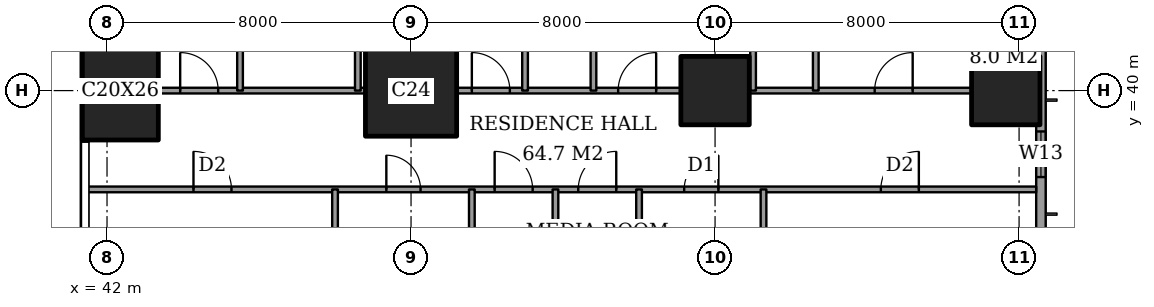
"""IFC4 building model, lengths in metres.
Left out: names, types, materials, properties, quantities, classifications, styles, units other than length and angle.
Written with IfcOpenShell. Run it as: python <this file> out.ifc"""

import sys

from ifc_helpers import new_model, si_unit, direction, frame, frame_2d, origin, origin_2d, place, context, subcontext, project, spatial, rectangle, extrude, element, fill, save


model = new_model("IFC4")
c1 = context("Model", 3, precision=1e-05, world=origin(), true_north=direction((0.0, 1.0)))
c2 = subcontext(c1, "Body", "Model", "MODEL_VIEW")
j1 = project(units=[si_unit("LENGTHUNIT", "METRE"), si_unit("PLANEANGLEUNIT", "RADIAN")], contexts=[c1])
p1 = place(None, origin())
s1 = spatial("IfcSite", under=j1, at=p1, CompositionType="ELEMENT")
p2 = place(p1, origin())
s2 = spatial("IfcBuilding", under=s1, at=p2, CompositionType="ELEMENT")
p3 = place(p2, frame((0.0, 0.0, 211.0)))
s3 = spatial("IfcBuildingStorey", under=s2, at=p3, CompositionType="ELEMENT", Elevation=211.0)
p4 = place(p3, frame((42.35, 40.0, 0.0), z_axis=(0.0, 0.0, 1.0), x_axis=(1.0, 0.0, 0.0)))
e1 = element("IfcColumn", 1, at=p4, inside=s3, PredefinedType="COLUMN", context=c2, shape_type="SweptSolid", body=[
    extrude(rectangle(XDim=2.0, YDim=2.6, at=origin_2d()), origin(), (0.0, 0.0, 1.0), 3.6),
])
p5 = place(p3, frame((50.0, 40.0, 0.0), z_axis=(0.0, 0.0, 1.0), x_axis=(1.0, 0.0, 0.0)))
e2 = element("IfcColumn", 2, at=p5, inside=s3, PredefinedType="COLUMN", context=c2, shape_type="SweptSolid", body=[
    extrude(rectangle(XDim=2.4, YDim=2.4, at=origin_2d()), origin(), (0.0, 0.0, 1.0), 3.6),
])
for number, where, z_axis, x_axis in (
    (3, (58.0, 40.0, 0.0), (0.0, 0.0, 1.0), (1.0, 0.0, 0.0)),
    (4, (65.65, 40.0, 0.0), (0.0, 0.0, 1.0), (1.0, 0.0, 0.0)),
):
    element("IfcColumn", number, at=place(p3, frame(where, z_axis=z_axis, x_axis=x_axis)), inside=s3, PredefinedType="COLUMN", context=c2, shape_type="SweptSolid", body=[
        extrude(rectangle(XDim=1.8, YDim=1.8, at=origin_2d()), origin(), (0.0, 0.0, 1.0), 3.6),
    ])
p6 = place(p3, frame((66.575, 3.175, 0.0), z_axis=(0.0, 0.0, 1.0), x_axis=(0.0, 1.0, 0.0)))
e5 = element("IfcWall", 5, at=p6, inside=s3, PredefinedType="SOLIDWALL", context=c2, shape_type="SweptSolid", body=[
    extrude(rectangle(XDim=41.65, YDim=0.25, at=frame_2d((20.825, 0.0))), origin(), (0.0, 0.0, 1.0), 3.6),
])
p7 = place(p6, frame((0.825, 0.0, 0.2)))
e6 = element("IfcOpeningElement", 6, at=p7, cuts=e5, PredefinedType="OPENING", context=c2, shape_type="SweptSolid", body=[
    extrude(rectangle(XDim=2.4, YDim=2.4, at=frame_2d((1.2, 1.2))), frame((0.0, 0.135, 0.0), z_axis=(0.0, -1.0, 0.0), x_axis=(1.0, 0.0, 0.0)), (0.0, 0.0, 1.0), 0.27),
])
p8 = place(p6, frame((6.225, 0.0, 0.2)))
e7 = element("IfcOpeningElement", 7, at=p8, cuts=e5, PredefinedType="OPENING", context=c2, shape_type="SweptSolid", body=[
    extrude(rectangle(XDim=1.2, YDim=2.4, at=frame_2d((0.6, 1.2))), frame((0.0, 0.135, 0.0), z_axis=(0.0, -1.0, 0.0), x_axis=(1.0, 0.0, 0.0)), (0.0, 0.0, 1.0), 0.27),
])
p9 = place(p6, frame((8.675, 0.0, 0.2)))
e8 = element("IfcOpeningElement", 8, at=p9, cuts=e5, PredefinedType="OPENING", context=c2, shape_type="SweptSolid", body=[
    extrude(rectangle(XDim=2.4, YDim=2.4, at=frame_2d((1.2, 1.2))), frame((0.0, 0.135, 0.0), z_axis=(0.0, -1.0, 0.0), x_axis=(1.0, 0.0, 0.0)), (0.0, 0.0, 1.0), 0.27),
])
p10 = place(p6, frame((15.675, 0.0, 0.2)))
e9 = element("IfcOpeningElement", 9, at=p10, cuts=e5, PredefinedType="OPENING", context=c2, shape_type="SweptSolid", body=[
    extrude(rectangle(XDim=2.4, YDim=2.4, at=frame_2d((1.2, 1.2))), frame((0.0, 0.135, 0.0), z_axis=(0.0, -1.0, 0.0), x_axis=(1.0, 0.0, 0.0)), (0.0, 0.0, 1.0), 0.27),
])
p11 = place(p6, frame((23.575, 0.0, 0.2)))
e10 = element("IfcOpeningElement", 10, at=p11, cuts=e5, PredefinedType="OPENING", context=c2, shape_type="SweptSolid", body=[
    extrude(rectangle(XDim=2.4, YDim=2.4, at=frame_2d((1.2, 1.2))), frame((0.0, 0.135, 0.0), z_axis=(0.0, -1.0, 0.0), x_axis=(1.0, 0.0, 0.0)), (0.0, 0.0, 1.0), 0.27),
])
p12 = place(p6, frame((30.775, 0.0, 0.2)))
e11 = element("IfcOpeningElement", 11, at=p12, cuts=e5, PredefinedType="OPENING", context=c2, shape_type="SweptSolid", body=[
    extrude(rectangle(XDim=2.4, YDim=2.4, at=frame_2d((1.2, 1.2))), frame((0.0, 0.135, 0.0), z_axis=(0.0, -1.0, 0.0), x_axis=(1.0, 0.0, 0.0)), (0.0, 0.0, 1.0), 0.27),
])
p13 = place(p6, frame((34.55, 0.0, 0.2)))
e12 = element("IfcOpeningElement", 12, at=p13, cuts=e5, PredefinedType="OPENING", context=c2, shape_type="SweptSolid", body=[
    extrude(rectangle(XDim=1.2, YDim=2.4, at=frame_2d((0.6, 1.2))), frame((0.0, 0.135, 0.0), z_axis=(0.0, -1.0, 0.0), x_axis=(1.0, 0.0, 0.0)), (0.0, 0.0, 1.0), 0.27),
])
p14 = place(p6, frame((38.425, 0.0, 0.2)))
e13 = element("IfcOpeningElement", 13, at=p14, cuts=e5, PredefinedType="OPENING", context=c2, shape_type="SweptSolid", body=[
    extrude(rectangle(XDim=2.4, YDim=2.4, at=frame_2d((1.2, 1.2))), frame((0.0, 0.135, 0.0), z_axis=(0.0, -1.0, 0.0), x_axis=(1.0, 0.0, 0.0)), (0.0, 0.0, 1.0), 0.27),
])
p15 = place(p3, frame((41.439, 37.4, 0.0), z_axis=(0.0, 0.0, 1.0), x_axis=(1.0, 0.0, 0.0)))
e14 = element("IfcWall", 14, at=p15, inside=s3, PredefinedType="PARTITIONING", context=c2, shape_type="SweptSolid", body=[
    extrude(rectangle(XDim=25.011, YDim=0.15, at=frame_2d((12.505, 0.0))), origin(), (0.0, 0.0, 1.0), 3.35),
])
p16 = place(p15, frame((10.761, 0.0, 0.0)))
e15 = element("IfcOpeningElement", 15, at=p16, cuts=e14, PredefinedType="OPENING", context=c2, shape_type="SweptSolid", body=[
    extrude(rectangle(XDim=1.0, YDim=2.1, at=frame_2d((0.5, 1.05))), frame((0.0, 0.085, 0.0), z_axis=(0.0, -1.0, 0.0), x_axis=(1.0, 0.0, 0.0)), (0.0, 0.0, 1.0), 0.17),
])
p17 = place(p15, frame((20.924, 0.0, 0.0)))
e16 = element("IfcOpeningElement", 16, at=p17, cuts=e14, PredefinedType="OPENING", context=c2, shape_type="SweptSolid", body=[
    extrude(rectangle(XDim=1.0, YDim=2.1, at=frame_2d((0.5, 1.05))), frame((0.0, 0.085, 0.0), z_axis=(0.0, -1.0, 0.0), x_axis=(1.0, 0.0, 0.0)), (0.0, 0.0, 1.0), 0.17),
])
p18 = place(p15, frame((15.749, 0.0, 0.0)))
e17 = element("IfcOpeningElement", 17, at=p18, cuts=e14, PredefinedType="OPENING", context=c2, shape_type="SweptSolid", body=[
    extrude(rectangle(XDim=0.9, YDim=2.1, at=frame_2d((0.45, 1.05))), frame((0.0, 0.085, 0.0), z_axis=(0.0, -1.0, 0.0), x_axis=(1.0, 0.0, 0.0)), (0.0, 0.0, 1.0), 0.17),
])
p19 = place(p15, frame((12.961, 0.0, 0.0)))
e18 = element("IfcOpeningElement", 18, at=p19, cuts=e14, PredefinedType="OPENING", context=c2, shape_type="SweptSolid", body=[
    extrude(rectangle(XDim=1.0, YDim=2.1, at=frame_2d((0.5, 1.05))), frame((0.0, 0.085, 0.0), z_axis=(0.0, -1.0, 0.0), x_axis=(1.0, 0.0, 0.0)), (0.0, 0.0, 1.0), 0.17),
])
p20 = place(p15, frame((7.911, 0.0, 0.0)))
e19 = element("IfcOpeningElement", 19, at=p20, cuts=e14, PredefinedType="OPENING", context=c2, shape_type="SweptSolid", body=[
    extrude(rectangle(XDim=0.9, YDim=2.1, at=frame_2d((0.45, 1.05))), frame((0.0, 0.085, 0.0), z_axis=(0.0, -1.0, 0.0), x_axis=(1.0, 0.0, 0.0)), (0.0, 0.0, 1.0), 0.17),
])
p21 = place(p15, frame((2.836, 0.0, 0.0)))
e20 = element("IfcOpeningElement", 20, at=p21, cuts=e14, PredefinedType="OPENING", context=c2, shape_type="SweptSolid", body=[
    extrude(rectangle(XDim=1.0, YDim=2.1, at=frame_2d((0.5, 1.05))), frame((0.0, 0.085, 0.0), z_axis=(0.0, -1.0, 0.0), x_axis=(1.0, 0.0, 0.0)), (0.0, 0.0, 1.0), 0.17),
])
p22 = place(p3, frame((43.35, 40.0, 0.0), z_axis=(0.0, 0.0, 1.0), x_axis=(1.0, 0.0, 0.0)))
e21 = element("IfcWall", 21, at=p22, inside=s3, PredefinedType="PARTITIONING", context=c2, shape_type="SweptSolid", body=[
    extrude(rectangle(XDim=5.45, YDim=0.15, at=frame_2d((2.725, 0.0))), origin(), (0.0, 0.0, 1.0), 3.35),
])
p23 = place(p22, frame((0.575, 0.0, 0.0)))
e22 = element("IfcOpeningElement", 22, at=p23, cuts=e21, PredefinedType="OPENING", context=c2, shape_type="SweptSolid", body=[
    extrude(rectangle(XDim=1.0, YDim=2.1, at=frame_2d((0.5, 1.05))), frame((0.0, 0.085, 0.0), z_axis=(0.0, -1.0, 0.0), x_axis=(1.0, 0.0, 0.0)), (0.0, 0.0, 1.0), 0.17),
])
p24 = place(p3, frame((51.2, 40.0, 0.0), z_axis=(0.0, 0.0, 1.0), x_axis=(1.0, 0.0, 0.0)))
e23 = element("IfcWall", 23, at=p24, inside=s3, PredefinedType="PARTITIONING", context=c2, shape_type="SweptSolid", body=[
    extrude(rectangle(XDim=5.9, YDim=0.15, at=frame_2d((2.95, 0.0))), origin(), (0.0, 0.0, 1.0), 3.35),
])
p25 = place(p24, frame((4.25, 0.0, 0.0)))
e24 = element("IfcOpeningElement", 24, at=p25, cuts=e23, PredefinedType="OPENING", context=c2, shape_type="SweptSolid", body=[
    extrude(rectangle(XDim=1.0, YDim=2.1, at=frame_2d((0.5, 1.05))), frame((0.0, 0.085, 0.0), z_axis=(0.0, -1.0, 0.0), x_axis=(1.0, 0.0, 0.0)), (0.0, 0.0, 1.0), 0.17),
])
p26 = place(p24, frame((0.4, 0.0, 0.0)))
e25 = element("IfcOpeningElement", 25, at=p26, cuts=e23, PredefinedType="OPENING", context=c2, shape_type="SweptSolid", body=[
    extrude(rectangle(XDim=1.0, YDim=2.1, at=frame_2d((0.5, 1.05))), frame((0.0, 0.085, 0.0), z_axis=(0.0, -1.0, 0.0), x_axis=(1.0, 0.0, 0.0)), (0.0, 0.0, 1.0), 0.17),
])
p27 = place(p3, frame((58.9, 40.0, 0.0), z_axis=(0.0, 0.0, 1.0), x_axis=(1.0, 0.0, 0.0)))
e26 = element("IfcWall", 26, at=p27, inside=s3, PredefinedType="PARTITIONING", context=c2, shape_type="SweptSolid", body=[
    extrude(rectangle(XDim=5.85, YDim=0.15, at=frame_2d((2.925, 0.0))), origin(), (0.0, 0.0, 1.0), 3.35),
])
p28 = place(p27, frame((3.3, 0.0, 0.0)))
e27 = element("IfcOpeningElement", 27, at=p28, cuts=e26, PredefinedType="OPENING", context=c2, shape_type="SweptSolid", body=[
    extrude(rectangle(XDim=1.0, YDim=2.1, at=frame_2d((0.5, 1.05))), frame((0.0, 0.085, 0.0), z_axis=(0.0, -1.0, 0.0), x_axis=(1.0, 0.0, 0.0)), (0.0, 0.0, 1.0), 0.17),
])
p29 = place(p3, frame((45.5, 40.0, 0.0), z_axis=(0.0, 0.0, 1.0), x_axis=(0.0, 1.0, 0.0)))
e28 = element("IfcWall", 28, at=p29, inside=s3, PredefinedType="PARTITIONING", context=c2, shape_type="SweptSolid", body=[
    extrude(rectangle(XDim=8.45, YDim=0.15, at=frame_2d((4.225, 0.0))), origin(), (0.0, 0.0, 1.0), 3.35),
])
p30 = place(p3, frame((48.0, 28.0, 0.0), z_axis=(0.0, 0.0, 1.0), x_axis=(0.0, 1.0, 0.0)))
e29 = element("IfcWall", 29, at=p30, inside=s3, PredefinedType="PARTITIONING", context=c2, shape_type="SweptSolid", body=[
    extrude(rectangle(XDim=9.4, YDim=0.15, at=frame_2d((4.7, 0.0))), origin(), (0.0, 0.0, 1.0), 3.35),
])
p31 = place(p30, frame((0.5, 0.0, 0.0)))
e30 = element("IfcOpeningElement", 30, at=p31, cuts=e29, PredefinedType="OPENING", context=c2, shape_type="SweptSolid", body=[
    extrude(rectangle(XDim=1.0, YDim=2.1, at=frame_2d((0.5, 1.05))), frame((0.0, 0.085, 0.0), z_axis=(0.0, -1.0, 0.0), x_axis=(1.0, 0.0, 0.0)), (0.0, 0.0, 1.0), 0.17),
])
p32 = place(p3, frame((48.6, 40.0, 0.0), z_axis=(0.0, 0.0, 1.0), x_axis=(0.0, 1.0, 0.0)))
e31 = element("IfcWall", 31, at=p32, inside=s3, PredefinedType="PARTITIONING", context=c2, shape_type="SweptSolid", body=[
    extrude(rectangle(XDim=8.45, YDim=0.15, at=frame_2d((4.225, 0.0))), origin(), (0.0, 0.0, 1.0), 3.35),
])
p33 = place(p32, frame((3.775, 0.0, 0.0)))
e32 = element("IfcOpeningElement", 32, at=p33, cuts=e31, PredefinedType="OPENING", context=c2, shape_type="SweptSolid", body=[
    extrude(rectangle(XDim=0.9, YDim=2.1, at=frame_2d((0.45, 1.05))), frame((0.0, 0.085, 0.0), z_axis=(0.0, -1.0, 0.0), x_axis=(1.0, 0.0, 0.0)), (0.0, 0.0, 1.0), 0.17),
])
p34 = place(p3, frame((51.6, 30.0, 0.0), z_axis=(0.0, 0.0, 1.0), x_axis=(0.0, 1.0, 0.0)))
e33 = element("IfcWall", 33, at=p34, inside=s3, PredefinedType="PARTITIONING", context=c2, shape_type="SweptSolid", body=[
    extrude(rectangle(XDim=7.4, YDim=0.15, at=frame_2d((3.7, 0.0))), origin(), (0.0, 0.0, 1.0), 3.35),
])
p35 = place(p3, frame((53.0, 40.0, 0.0), z_axis=(0.0, 0.0, 1.0), x_axis=(0.0, 1.0, 0.0)))
e34 = element("IfcWall", 34, at=p35, inside=s3, PredefinedType="PARTITIONING", context=c2, shape_type="SweptSolid", body=[
    extrude(rectangle(XDim=8.45, YDim=0.15, at=frame_2d((4.225, 0.0))), origin(), (0.0, 0.0, 1.0), 3.35),
])
p36 = place(p3, frame((53.8, 30.0, 0.0), z_axis=(0.0, 0.0, 1.0), x_axis=(0.0, 1.0, 0.0)))
e35 = element("IfcWall", 35, at=p36, inside=s3, PredefinedType="PARTITIONING", context=c2, shape_type="SweptSolid", body=[
    extrude(rectangle(XDim=7.4, YDim=0.15, at=frame_2d((3.7, 0.0))), origin(), (0.0, 0.0, 1.0), 3.35),
])
p37 = place(p3, frame((54.8, 40.0, 0.0), z_axis=(0.0, 0.0, 1.0), x_axis=(0.0, 1.0, 0.0)))
e36 = element("IfcWall", 36, at=p37, inside=s3, PredefinedType="PARTITIONING", context=c2, shape_type="SweptSolid", body=[
    extrude(rectangle(XDim=8.45, YDim=0.15, at=frame_2d((4.225, 0.0))), origin(), (0.0, 0.0, 1.0), 3.35),
])
p38 = place(p37, frame((3.775, 0.0, 0.0)))
e37 = element("IfcOpeningElement", 37, at=p38, cuts=e36, PredefinedType="OPENING", context=c2, shape_type="SweptSolid", body=[
    extrude(rectangle(XDim=0.9, YDim=2.1, at=frame_2d((0.45, 1.05))), frame((0.0, 0.085, 0.0), z_axis=(0.0, -1.0, 0.0), x_axis=(1.0, 0.0, 0.0)), (0.0, 0.0, 1.0), 0.17),
])
p39 = place(p3, frame((56.0, 28.0, 0.0), z_axis=(0.0, 0.0, 1.0), x_axis=(0.0, 1.0, 0.0)))
e38 = element("IfcWall", 38, at=p39, inside=s3, PredefinedType="PARTITIONING", context=c2, shape_type="SweptSolid", body=[
    extrude(rectangle(XDim=9.4, YDim=0.15, at=frame_2d((4.7, 0.0))), origin(), (0.0, 0.0, 1.0), 3.35),
])
p40 = place(p39, frame((0.5, 0.0, 0.0)))
e39 = element("IfcOpeningElement", 39, at=p40, cuts=e38, PredefinedType="OPENING", context=c2, shape_type="SweptSolid", body=[
    extrude(rectangle(XDim=1.0, YDim=2.1, at=frame_2d((0.5, 1.05))), frame((0.0, 0.085, 0.0), z_axis=(0.0, -1.0, 0.0), x_axis=(1.0, 0.0, 0.0)), (0.0, 0.0, 1.0), 0.17),
])
p41 = place(p3, frame((59.0, 40.0, 0.0), z_axis=(0.0, 0.0, 1.0), x_axis=(0.0, 1.0, 0.0)))
e40 = element("IfcWall", 40, at=p41, inside=s3, PredefinedType="PARTITIONING", context=c2, shape_type="SweptSolid", body=[
    extrude(rectangle(XDim=8.45, YDim=0.15, at=frame_2d((4.225, 0.0))), origin(), (0.0, 0.0, 1.0), 3.35),
])
p42 = place(p3, frame((59.275, 33.2, 0.0), z_axis=(0.0, 0.0, 1.0), x_axis=(0.0, 1.0, 0.0)))
e41 = element("IfcWall", 41, at=p42, inside=s3, PredefinedType="PARTITIONING", context=c2, shape_type="SweptSolid", body=[
    extrude(rectangle(XDim=4.2, YDim=0.15, at=frame_2d((2.1, 0.0))), origin(), (0.0, 0.0, 1.0), 3.35),
])
p43 = place(p3, frame((60.65, 40.0, 0.0), z_axis=(0.0, 0.0, 1.0), x_axis=(0.0, 1.0, 0.0)))
e42 = element("IfcWall", 42, at=p43, inside=s3, PredefinedType="PARTITIONING", context=c2, shape_type="SweptSolid", body=[
    extrude(rectangle(XDim=8.45, YDim=0.15, at=frame_2d((4.225, 0.0))), origin(), (0.0, 0.0, 1.0), 3.35),
])
p44 = place(p43, frame((3.775, 0.0, 0.0)))
e43 = element("IfcOpeningElement", 43, at=p44, cuts=e42, PredefinedType="OPENING", context=c2, shape_type="SweptSolid", body=[
    extrude(rectangle(XDim=0.9, YDim=2.1, at=frame_2d((0.45, 1.05))), frame((0.0, 0.085, 0.0), z_axis=(0.0, -1.0, 0.0), x_axis=(1.0, 0.0, 0.0)), (0.0, 0.0, 1.0), 0.17),
])
p45 = place(p3, frame((64.75, 40.9, 0.0), z_axis=(0.0, 0.0, 1.0), x_axis=(0.0, 1.0, 0.0)))
e44 = element("IfcWall", 44, at=p45, inside=s3, PredefinedType="PARTITIONING", context=c2, shape_type="SweptSolid", body=[
    extrude(rectangle(XDim=3.8, YDim=0.15, at=frame_2d((1.9, 0.0))), origin(), (0.0, 0.0, 1.0), 3.35),
])
p46 = place(p45, frame((1.45, 0.0, 0.0)))
e45 = element("IfcOpeningElement", 45, at=p46, cuts=e44, PredefinedType="OPENING", context=c2, shape_type="SweptSolid", body=[
    extrude(rectangle(XDim=0.9, YDim=2.1, at=frame_2d((0.45, 1.05))), frame((0.0, 0.085, 0.0), z_axis=(0.0, -1.0, 0.0), x_axis=(1.0, 0.0, 0.0)), (0.0, 0.0, 1.0), 0.17),
])
p47 = place(p13, origin())
e46 = element("IfcWindow", 46, at=p47, inside=s3, PartitioningType="SINGLE_PANEL", PredefinedType="WINDOW", context=c2, shape_type="SweptSolid", body=[
    extrude(rectangle(XDim=1.2, YDim=2.4, at=frame_2d((0.6, 1.2))), frame((0.0, 0.03, 0.0), z_axis=(0.0, -1.0, 0.0), x_axis=(1.0, 0.0, 0.0)), (0.0, 0.0, 1.0), 0.06),
])
fill(e12, e46)
p48 = place(p28, origin())
e47 = element("IfcDoor", 47, at=p48, inside=s3, OperationType="SINGLE_SWING_LEFT", PredefinedType="DOOR", context=c2, shape_type="SweptSolid", body=[
    extrude(rectangle(XDim=1.0, YDim=2.1, at=frame_2d((0.5, 1.05))), frame((0.0, 0.025, 0.0), z_axis=(0.0, -1.0, 0.0), x_axis=(1.0, 0.0, 0.0)), (0.0, 0.0, 1.0), 0.05),
])
fill(e27, e47)
p49 = place(p25, origin())
e48 = element("IfcDoor", 48, at=p49, inside=s3, OperationType="SINGLE_SWING_LEFT", PredefinedType="DOOR", context=c2, shape_type="SweptSolid", body=[
    extrude(rectangle(XDim=1.0, YDim=2.1, at=frame_2d((0.5, 1.05))), frame((0.0, 0.025, 0.0), z_axis=(0.0, -1.0, 0.0), x_axis=(1.0, 0.0, 0.0)), (0.0, 0.0, 1.0), 0.05),
])
fill(e24, e48)
p50 = place(p26, origin())
e49 = element("IfcDoor", 49, at=p50, inside=s3, OperationType="SINGLE_SWING_RIGHT", PredefinedType="DOOR", context=c2, shape_type="SweptSolid", body=[
    extrude(rectangle(XDim=1.0, YDim=2.1, at=frame_2d((0.5, 1.05))), frame((0.0, 0.025, 0.0), z_axis=(0.0, -1.0, 0.0), x_axis=(1.0, 0.0, 0.0)), (0.0, 0.0, 1.0), 0.05),
])
fill(e25, e49)
p51 = place(p23, origin())
e50 = element("IfcDoor", 50, at=p51, inside=s3, OperationType="SINGLE_SWING_RIGHT", PredefinedType="DOOR", context=c2, shape_type="SweptSolid", body=[
    extrude(rectangle(XDim=1.0, YDim=2.1, at=frame_2d((0.5, 1.05))), frame((0.0, 0.025, 0.0), z_axis=(0.0, -1.0, 0.0), x_axis=(1.0, 0.0, 0.0)), (0.0, 0.0, 1.0), 0.05),
])
fill(e22, e50)
p52 = place(p16, origin())
e51 = element("IfcDoor", 51, at=p52, inside=s3, OperationType="SINGLE_SWING_RIGHT", PredefinedType="DOOR", context=c2, shape_type="SweptSolid", body=[
    extrude(rectangle(XDim=1.0, YDim=2.1, at=frame_2d((0.5, 1.05))), frame((0.0, 0.025, 0.0), z_axis=(0.0, -1.0, 0.0), x_axis=(1.0, 0.0, 0.0)), (0.0, 0.0, 1.0), 0.05),
])
fill(e15, e51)
p53 = place(p17, origin())
e52 = element("IfcDoor", 52, at=p53, inside=s3, OperationType="SINGLE_SWING_LEFT", PredefinedType="DOOR", context=c2, shape_type="SweptSolid", body=[
    extrude(rectangle(XDim=1.0, YDim=2.1, at=frame_2d((0.5, 1.05))), frame((0.0, 0.025, 0.0), z_axis=(0.0, -1.0, 0.0), x_axis=(1.0, 0.0, 0.0)), (0.0, 0.0, 1.0), 0.05),
])
fill(e16, e52)
p54 = place(p18, origin())
e53 = element("IfcDoor", 53, at=p54, inside=s3, OperationType="SINGLE_SWING_LEFT", PredefinedType="DOOR", context=c2, shape_type="SweptSolid", body=[
    extrude(rectangle(XDim=0.9, YDim=2.1, at=frame_2d((0.45, 1.05))), frame((0.0, 0.025, 0.0), z_axis=(0.0, -1.0, 0.0), x_axis=(1.0, 0.0, 0.0)), (0.0, 0.0, 1.0), 0.05),
])
fill(e17, e53)
p55 = place(p19, origin())
e54 = element("IfcDoor", 54, at=p55, inside=s3, OperationType="SINGLE_SWING_LEFT", PredefinedType="DOOR", context=c2, shape_type="SweptSolid", body=[
    extrude(rectangle(XDim=1.0, YDim=2.1, at=frame_2d((0.5, 1.05))), frame((0.0, 0.025, 0.0), z_axis=(0.0, -1.0, 0.0), x_axis=(1.0, 0.0, 0.0)), (0.0, 0.0, 1.0), 0.05),
])
fill(e18, e54)
p56 = place(p20, origin())
e55 = element("IfcDoor", 55, at=p56, inside=s3, OperationType="SINGLE_SWING_RIGHT", PredefinedType="DOOR", context=c2, shape_type="SweptSolid", body=[
    extrude(rectangle(XDim=0.9, YDim=2.1, at=frame_2d((0.45, 1.05))), frame((0.0, 0.025, 0.0), z_axis=(0.0, -1.0, 0.0), x_axis=(1.0, 0.0, 0.0)), (0.0, 0.0, 1.0), 0.05),
])
fill(e19, e55)
p57 = place(p21, origin())
e56 = element("IfcDoor", 56, at=p57, inside=s3, OperationType="SINGLE_SWING_RIGHT", PredefinedType="DOOR", context=c2, shape_type="SweptSolid", body=[
    extrude(rectangle(XDim=1.0, YDim=2.1, at=frame_2d((0.5, 1.05))), frame((0.0, 0.025, 0.0), z_axis=(0.0, -1.0, 0.0), x_axis=(1.0, 0.0, 0.0)), (0.0, 0.0, 1.0), 0.05),
])
fill(e20, e56)
save(model, sys.argv[1])
